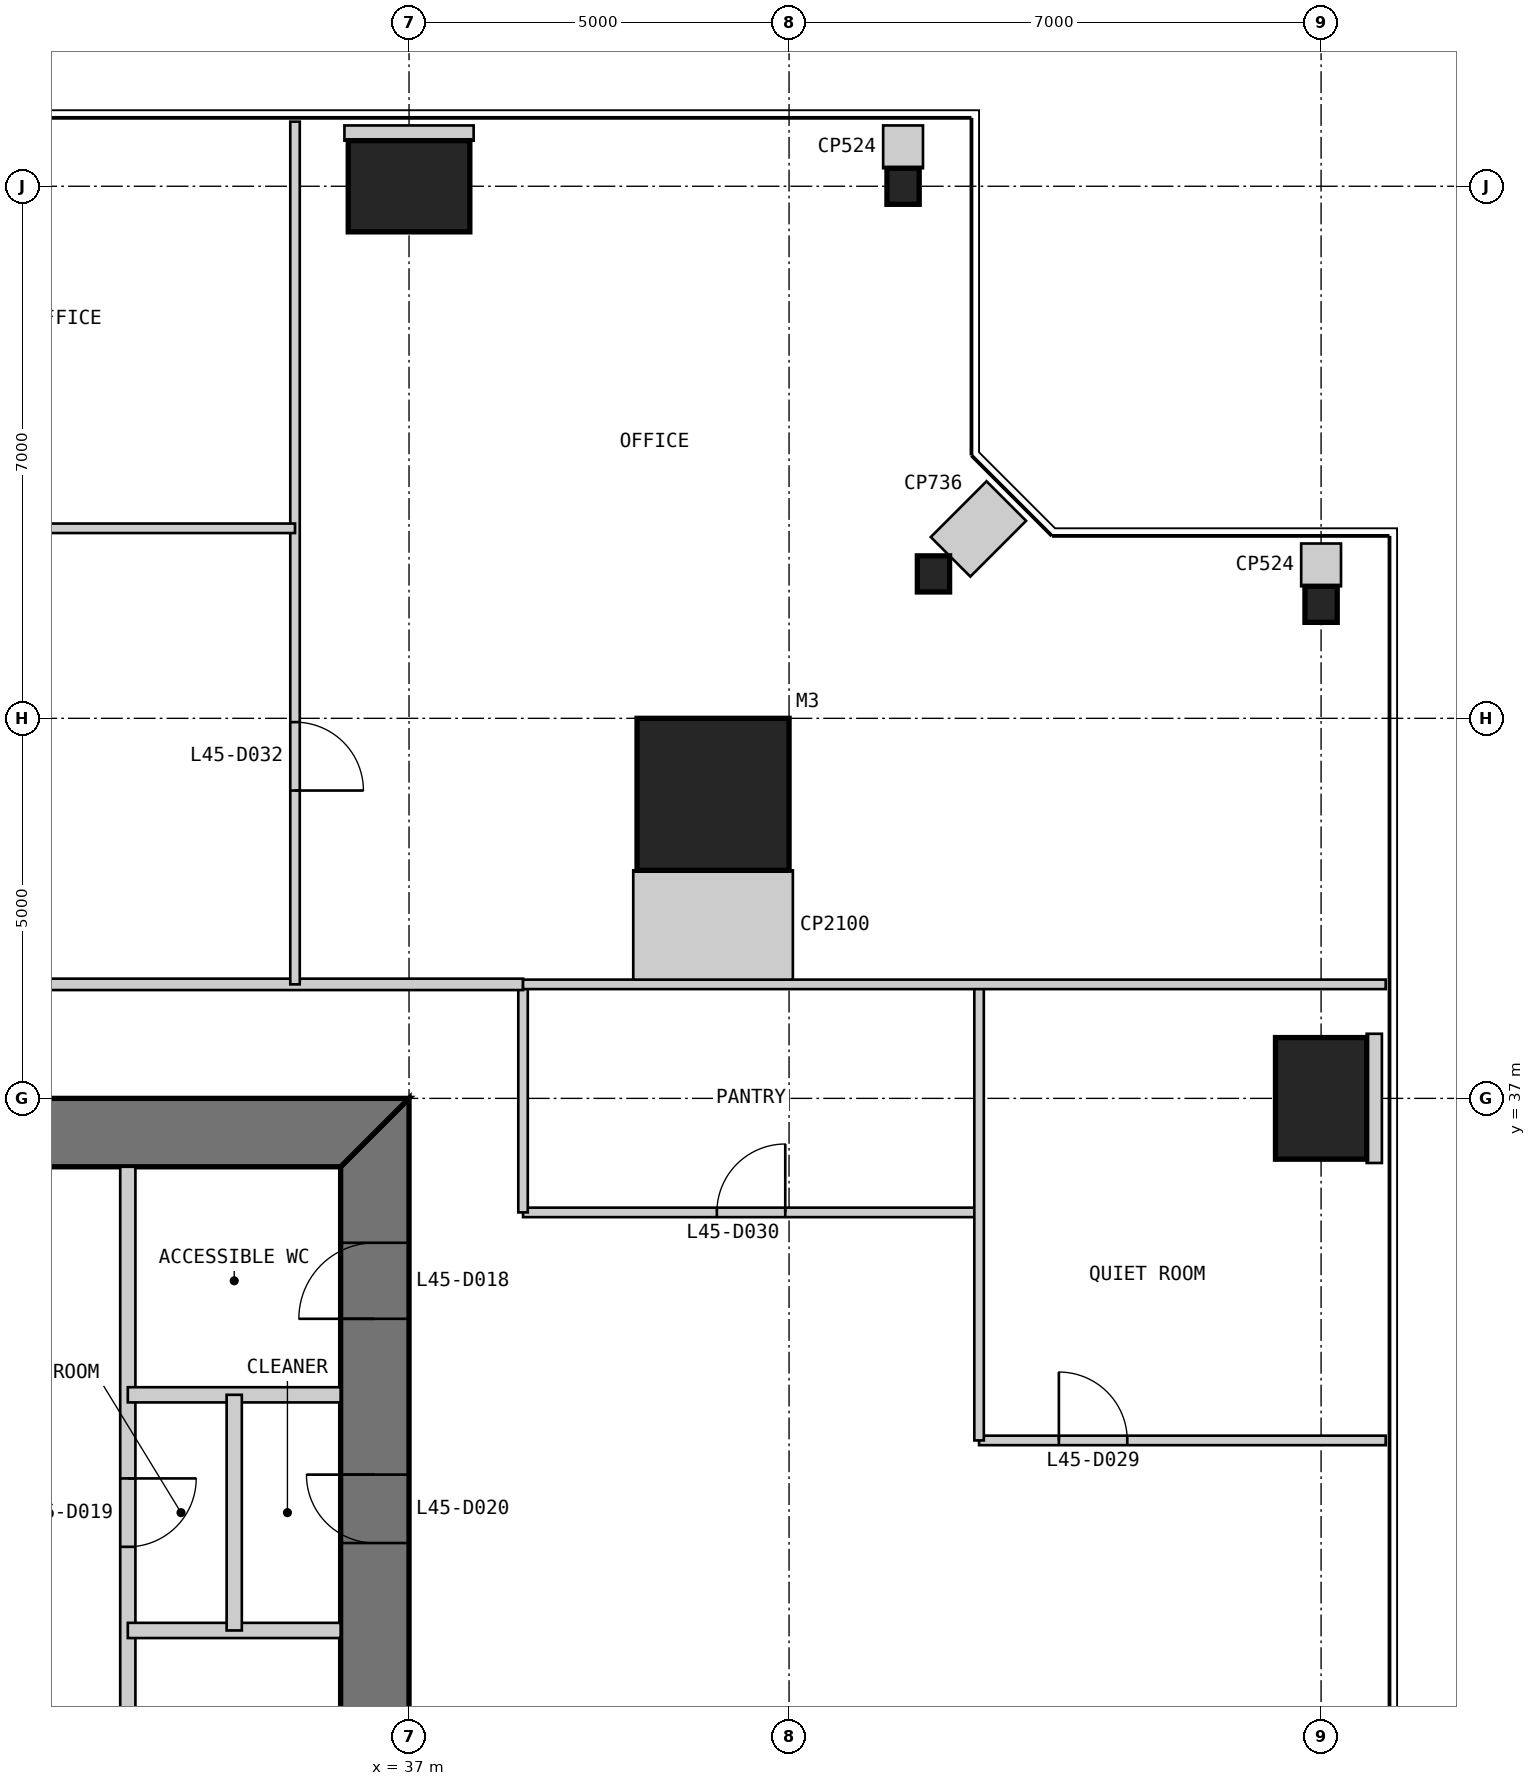
"""IFC4 building model, lengths in metres.
Left out: names, types, materials, properties, quantities, classifications, styles, units other than length and angle.
Written with IfcOpenShell. Run it as: python <this file> out.ifc"""

import sys

from ifc_helpers import new_model, si_unit, direction, frame, frame_2d, origin, origin_2d, place, context, subcontext, project, spatial, polyline, rectangle, i_section, outline, extrude, element, fill, save


model = new_model("IFC4")
c1 = context("Model", 3, precision=1e-05, world=origin(), true_north=direction((0.0, 1.0)))
c2 = subcontext(c1, "Body", "Model", "MODEL_VIEW")
j1 = project(units=[si_unit("LENGTHUNIT", "METRE"), si_unit("PLANEANGLEUNIT", "RADIAN")], contexts=[c1])
p1 = place(None, origin())
s1 = spatial("IfcSite", under=j1, at=p1, CompositionType="ELEMENT")
p2 = place(p1, origin())
s2 = spatial("IfcBuilding", under=s1, at=p2, CompositionType="ELEMENT")
p3 = place(p2, frame((0.0, 0.0, 193.8)))
s3 = spatial("IfcBuildingStorey", under=s2, at=p3, CompositionType="ELEMENT", Elevation=193.8)
p4 = place(p3, frame((41.0, 41.0, 0.0), z_axis=(0.0, 0.0, 1.0), x_axis=(1.0, 0.0, 0.0)))
e1 = element("IfcColumn", 1, at=p4, inside=s3, PredefinedType="COLUMN", context=c2, shape_type="SweptSolid", body=[
    extrude(rectangle(XDim=2.0, YDim=2.0, at=origin_2d()), origin(), (0.0, 0.0, 1.0), 4.0),
])
p5 = place(p3, frame((49.0, 37.0, 0.0), z_axis=(0.0, 0.0, 1.0), x_axis=(1.0, 0.0, 0.0)))
e2 = element("IfcColumn", 2, at=p5, inside=s3, PredefinedType="COLUMN", context=c2, shape_type="SweptSolid", body=[
    extrude(rectangle(XDim=1.2, YDim=1.6, at=origin_2d()), origin(), (0.0, 0.0, 1.0), 4.0),
])
for number, where, z_axis, x_axis in (
    (3, (49.0, 43.5, 0.0), (0.0, 0.0, 1.0), (1.0, 0.0, 0.0)),
    (4, (43.9, 43.9, 0.0), (0.0, 0.0, 1.0), (1.0, 0.0, 0.0)),
    (5, (43.5, 49.0, 0.0), (0.0, 0.0, 1.0), (1.0, 0.0, 0.0)),
):
    element("IfcColumn", number, at=place(p3, frame(where, z_axis=z_axis, x_axis=x_axis)), inside=s3, PredefinedType="COLUMN", context=c2, shape_type="SweptSolid", body=[
        extrude(i_section(OverallWidth=0.424, OverallDepth=0.475, WebThickness=0.048, FlangeThickness=0.077, at=origin_2d()), origin(), (0.0, 0.0, 1.0), 4.0),
    ])
p6 = place(p3, frame((37.0, 49.0, 0.0), z_axis=(0.0, 0.0, 1.0), x_axis=(1.0, 0.0, 0.0)))
e6 = element("IfcColumn", 6, at=p6, inside=s3, PredefinedType="COLUMN", context=c2, shape_type="SweptSolid", body=[
    extrude(rectangle(XDim=1.6, YDim=1.2, at=origin_2d()), origin(), (0.0, 0.0, 1.0), 4.0),
])
p7 = place(p3, frame((36.55, 13.9, 0.0), z_axis=(0.0, 0.0, 1.0), x_axis=(0.0, 1.0, 0.0)))
e7 = element("IfcWall", 7, at=p7, inside=s3, PredefinedType="SHEAR", context=c2, shape_type="SweptSolid", body=[
    extrude(outline(polyline([(-0.9, -0.45), (23.1, -0.45), (22.2, 0.45), (0.0, 0.45), (-0.9, -0.45)])), origin(), (0.0, 0.0, 1.0), 4.0),
])
p8 = place(p7, frame((20.2, 0.0, 0.0)))
e8 = element("IfcOpeningElement", 8, at=p8, cuts=e7, PredefinedType="OPENING", context=c2, shape_type="SweptSolid", body=[
    extrude(rectangle(XDim=1.0, YDim=2.2, at=frame_2d((0.5, 1.1))), frame((0.0, 0.46, 0.0), z_axis=(0.0, -1.0, 0.0), x_axis=(1.0, 0.0, 0.0)), (0.0, 0.0, 1.0), 0.92),
])
p9 = place(p7, frame((17.25, 0.0, 0.0)))
e9 = element("IfcOpeningElement", 9, at=p9, cuts=e7, PredefinedType="OPENING", context=c2, shape_type="SweptSolid", body=[
    extrude(rectangle(XDim=0.9, YDim=2.2, at=frame_2d((0.45, 1.1))), frame((0.0, 0.46, 0.0), z_axis=(0.0, -1.0, 0.0), x_axis=(1.0, 0.0, 0.0)), (0.0, 0.0, 1.0), 0.92),
])
p10 = place(p3, frame((37.0, 36.55, 0.0), z_axis=(0.0, 0.0, 1.0), x_axis=(-1.0, 0.0, 0.0)))
e10 = element("IfcWall", 10, at=p10, inside=s3, PredefinedType="SHEAR", context=c2, shape_type="SweptSolid", body=[
    extrude(outline(polyline([(0.0, -0.45), (24.0, -0.45), (23.1, 0.45), (0.9, 0.45), (0.0, -0.45)])), origin(), (0.0, 0.0, 1.0), 4.0),
])
p11 = place(p10, frame((4.9, 0.0, 0.0)))
e11 = element("IfcOpeningElement", 11, at=p11, cuts=e10, PredefinedType="OPENING", context=c2, shape_type="SweptSolid", body=[
    extrude(rectangle(XDim=1.0, YDim=2.2, at=frame_2d((0.5, 1.1))), frame((0.0, 0.46, 0.0), z_axis=(0.0, -1.0, 0.0), x_axis=(1.0, 0.0, 0.0)), (0.0, 0.0, 1.0), 0.92),
])
p12 = place(p10, frame((8.9, 0.0, 0.0)))
e12 = element("IfcOpeningElement", 12, at=p12, cuts=e10, PredefinedType="OPENING", context=c2, shape_type="SweptSolid", body=[
    extrude(rectangle(XDim=1.1, YDim=2.2, at=frame_2d((0.55, 1.1))), frame((0.0, 0.46, 0.0), z_axis=(0.0, -1.0, 0.0), x_axis=(1.0, 0.0, 0.0)), (0.0, 0.0, 1.0), 0.92),
])
p13 = place(p10, frame((15.05, 0.0, 0.0)))
e13 = element("IfcOpeningElement", 13, at=p13, cuts=e10, PredefinedType="OPENING", context=c2, shape_type="SweptSolid", body=[
    extrude(rectangle(XDim=0.9, YDim=2.2, at=frame_2d((0.45, 1.1))), frame((0.0, 0.46, 0.0), z_axis=(0.0, -1.0, 0.0), x_axis=(1.0, 0.0, 0.0)), (0.0, 0.0, 1.0), 0.92),
])
p14 = place(p10, frame((17.9, 0.0, 0.0)))
e14 = element("IfcOpeningElement", 14, at=p14, cuts=e10, PredefinedType="OPENING", context=c2, shape_type="SweptSolid", body=[
    extrude(rectangle(XDim=1.0, YDim=2.2, at=frame_2d((0.5, 1.1))), frame((0.0, 0.46, 0.0), z_axis=(0.0, -1.0, 0.0), x_axis=(1.0, 0.0, 0.0)), (0.0, 0.0, 1.0), 0.92),
])
p15 = place(p10, frame((21.4, 0.0, 0.0)))
e15 = element("IfcOpeningElement", 15, at=p15, cuts=e10, PredefinedType="OPENING", context=c2, shape_type="SweptSolid", body=[
    extrude(rectangle(XDim=1.0, YDim=2.2, at=frame_2d((0.5, 1.1))), frame((0.0, 0.46, 0.0), z_axis=(0.0, -1.0, 0.0), x_axis=(1.0, 0.0, 0.0)), (0.0, 0.0, 1.0), 0.92),
])
p16 = place(p3, frame((33.3, 36.1, 0.0), z_axis=(0.0, 0.0, 1.0), x_axis=(0.0, -1.0, 0.0)))
e16 = element("IfcWall", 16, at=p16, inside=s3, PredefinedType="PARTITIONING", context=c2, shape_type="SweptSolid", body=[
    extrude(rectangle(XDim=16.1, YDim=0.2, at=frame_2d((8.05, 0.0))), origin(), (0.0, 0.0, 1.0), 3.8),
])
p17 = place(p16, frame((4.1, 0.0, 0.0)))
e17 = element("IfcOpeningElement", 17, at=p17, cuts=e16, PredefinedType="OPENING", context=c2, shape_type="SweptSolid", body=[
    extrude(rectangle(XDim=0.9, YDim=2.2, at=frame_2d((0.45, 1.1))), frame((0.0, 0.11, 0.0), z_axis=(0.0, -1.0, 0.0), x_axis=(1.0, 0.0, 0.0)), (0.0, 0.0, 1.0), 0.22),
])
for number, where, z_axis, x_axis in (
    (18, (36.1, 30.0, 0.0), (0.0, 0.0, 1.0), (-1.0, 0.0, 0.0)),
    (19, (36.1, 33.1, 0.0), (0.0, 0.0, 1.0), (-1.0, 0.0, 0.0)),
):
    element("IfcWall", number, at=place(p3, frame(where, z_axis=z_axis, x_axis=x_axis)), inside=s3, PredefinedType="PARTITIONING", context=c2, shape_type="SweptSolid", body=[
        extrude(rectangle(XDim=2.8, YDim=0.2, at=frame_2d((1.4, 0.0))), origin(), (0.0, 0.0, 1.0), 3.8),
    ])
p18 = place(p3, frame((34.7, 33.1, 0.0), z_axis=(0.0, 0.0, 1.0), x_axis=(0.0, -1.0, 0.0)))
e20 = element("IfcWall", 20, at=p18, inside=s3, PredefinedType="PARTITIONING", context=c2, shape_type="SweptSolid", body=[
    extrude(rectangle(XDim=3.1, YDim=0.2, at=frame_2d((1.55, 0.0))), origin(), (0.0, 0.0, 1.0), 3.8),
])
p19 = place(p3, frame((49.85, 32.5, 0.0), z_axis=(0.0, 0.0, 1.0), x_axis=(-1.0, 0.0, 0.0)))
e21 = element("IfcWall", 21, at=p19, inside=s3, PredefinedType="PARTITIONING", context=c2, shape_type="SweptSolid", body=[
    extrude(rectangle(XDim=5.35, YDim=0.125, at=frame_2d((2.675, 0.0))), origin(), (0.0, 0.0, 1.0), 3.85),
])
p20 = place(p19, frame((3.4, 0.0, 0.0)))
e22 = element("IfcOpeningElement", 22, at=p20, cuts=e21, PredefinedType="OPENING", context=c2, shape_type="SweptSolid", body=[
    extrude(rectangle(XDim=0.9, YDim=2.2, at=frame_2d((0.45, 1.1))), frame((0.0, 0.073, 0.0), z_axis=(0.0, -1.0, 0.0), x_axis=(1.0, 0.0, 0.0)), (0.0, 0.0, 1.0), 0.145),
])
p21 = place(p3, frame((44.5, 35.5, 0.0), z_axis=(0.0, 0.0, 1.0), x_axis=(-1.0, 0.0, 0.0)))
e23 = element("IfcWall", 23, at=p21, inside=s3, PredefinedType="PARTITIONING", context=c2, shape_type="SweptSolid", body=[
    extrude(rectangle(XDim=6.0, YDim=0.125, at=frame_2d((3.0, 0.0))), origin(), (0.0, 0.0, 1.0), 3.85),
])
p22 = place(p21, frame((2.55, 0.0, 0.0)))
e24 = element("IfcOpeningElement", 24, at=p22, cuts=e23, PredefinedType="OPENING", context=c2, shape_type="SweptSolid", body=[
    extrude(rectangle(XDim=0.9, YDim=2.2, at=frame_2d((0.45, 1.1))), frame((0.0, 0.073, 0.0), z_axis=(0.0, -1.0, 0.0), x_axis=(1.0, 0.0, 0.0)), (0.0, 0.0, 1.0), 0.145),
])
p23 = place(p3, frame((44.5, 32.5, 0.0), z_axis=(0.0, 0.0, 1.0), x_axis=(0.0, 1.0, 0.0)))
e25 = element("IfcWall", 25, at=p23, inside=s3, PredefinedType="PARTITIONING", context=c2, shape_type="SweptSolid", body=[
    extrude(rectangle(XDim=6.0, YDim=0.125, at=frame_2d((3.0, 0.0))), origin(), (0.0, 0.0, 1.0), 3.85),
])
p24 = place(p3, frame((38.5, 35.5, 0.0), z_axis=(0.0, 0.0, 1.0), x_axis=(0.0, 1.0, 0.0)))
e26 = element("IfcWall", 26, at=p24, inside=s3, PredefinedType="PARTITIONING", context=c2, shape_type="SweptSolid", body=[
    extrude(rectangle(XDim=3.0, YDim=0.125, at=frame_2d((1.5, 0.0))), origin(), (0.0, 0.0, 1.0), 3.85),
])
p25 = place(p3, frame((38.5, 38.5, 0.0), z_axis=(0.0, 0.0, 1.0), x_axis=(-1.0, 0.0, 0.0)))
e27 = element("IfcWall", 27, at=p25, inside=s3, PredefinedType="PARTITIONING", context=c2, shape_type="SweptSolid", body=[
    extrude(rectangle(XDim=27.0, YDim=0.15, at=frame_2d((13.5, 0.0))), origin(), (0.0, 0.0, 1.0), 3.85),
])
p26 = place(p25, frame((13.0, 0.0, 0.0)))
e28 = element("IfcOpeningElement", 28, at=p26, cuts=e27, PredefinedType="OPENING", context=c2, shape_type="SweptSolid", body=[
    extrude(rectangle(XDim=1.0, YDim=2.2, at=frame_2d((0.5, 1.1))), frame((0.0, 0.085, 0.0), z_axis=(0.0, -1.0, 0.0), x_axis=(1.0, 0.0, 0.0)), (0.0, 0.0, 1.0), 0.17),
])
p27 = place(p3, frame((49.85, 38.5, 0.0), z_axis=(0.0, 0.0, 1.0), x_axis=(-1.0, 0.0, 0.0)))
e29 = element("IfcWall", 29, at=p27, inside=s3, PredefinedType="PARTITIONING", context=c2, shape_type="SweptSolid", body=[
    extrude(rectangle(XDim=11.35, YDim=0.125, at=frame_2d((5.675, 0.0))), origin(), (0.0, 0.0, 1.0), 3.85),
])
p28 = place(p3, frame((35.5, 49.85, 0.0), z_axis=(0.0, 0.0, 1.0), x_axis=(0.0, -1.0, 0.0)))
e30 = element("IfcWall", 30, at=p28, inside=s3, PredefinedType="PARTITIONING", context=c2, shape_type="SweptSolid", body=[
    extrude(rectangle(XDim=11.35, YDim=0.125, at=frame_2d((5.675, 0.0))), origin(), (0.0, 0.0, 1.0), 3.85),
])
p29 = place(p28, frame((7.9, 0.0, 0.0)))
e31 = element("IfcOpeningElement", 31, at=p29, cuts=e30, PredefinedType="OPENING", context=c2, shape_type="SweptSolid", body=[
    extrude(rectangle(XDim=0.9, YDim=2.2, at=frame_2d((0.45, 1.1))), frame((0.0, 0.073, 0.0), z_axis=(0.0, -1.0, 0.0), x_axis=(1.0, 0.0, 0.0)), (0.0, 0.0, 1.0), 0.145),
])
p30 = place(p3, frame((35.5, 44.5, 0.0), z_axis=(0.0, 0.0, 1.0), x_axis=(-1.0, 0.0, 0.0)))
e32 = element("IfcWall", 32, at=p30, inside=s3, PredefinedType="PARTITIONING", context=c2, shape_type="SweptSolid", body=[
    extrude(rectangle(XDim=24.0, YDim=0.125, at=frame_2d((12.0, 0.0))), origin(), (0.0, 0.0, 1.0), 3.85),
])
p31 = place(p30, frame((4.05, 0.0, 0.0)))
e33 = element("IfcOpeningElement", 33, at=p31, cuts=e32, PredefinedType="OPENING", context=c2, shape_type="SweptSolid", body=[
    extrude(rectangle(XDim=0.9, YDim=2.2, at=frame_2d((0.45, 1.1))), frame((0.0, 0.073, 0.0), z_axis=(0.0, -1.0, 0.0), x_axis=(1.0, 0.0, 0.0)), (0.0, 0.0, 1.0), 0.145),
])
p32 = place(p30, frame((10.05, 0.0, 0.0)))
e34 = element("IfcOpeningElement", 34, at=p32, cuts=e32, PredefinedType="OPENING", context=c2, shape_type="SweptSolid", body=[
    extrude(rectangle(XDim=0.9, YDim=2.2, at=frame_2d((0.45, 1.1))), frame((0.0, 0.073, 0.0), z_axis=(0.0, -1.0, 0.0), x_axis=(1.0, 0.0, 0.0)), (0.0, 0.0, 1.0), 0.145),
])
p33 = place(p30, frame((16.05, 0.0, 0.0)))
e35 = element("IfcOpeningElement", 35, at=p33, cuts=e32, PredefinedType="OPENING", context=c2, shape_type="SweptSolid", body=[
    extrude(rectangle(XDim=0.9, YDim=2.2, at=frame_2d((0.45, 1.1))), frame((0.0, 0.073, 0.0), z_axis=(0.0, -1.0, 0.0), x_axis=(1.0, 0.0, 0.0)), (0.0, 0.0, 1.0), 0.145),
])
p34 = place(p30, frame((19.05, 0.0, 0.0)))
e36 = element("IfcOpeningElement", 36, at=p34, cuts=e32, PredefinedType="OPENING", context=c2, shape_type="SweptSolid", body=[
    extrude(rectangle(XDim=0.9, YDim=2.2, at=frame_2d((0.45, 1.1))), frame((0.0, 0.073, 0.0), z_axis=(0.0, -1.0, 0.0), x_axis=(1.0, 0.0, 0.0)), (0.0, 0.0, 1.0), 0.145),
])
p35 = place(p3, frame((49.8, 37.0, 0.0), z_axis=(0.0, 0.0, 1.0), x_axis=(-1.0, 0.0, 0.0)))
e37 = element("IfcWall", 37, at=p35, inside=s3, PredefinedType="PARTITIONING", context=c2, shape_type="SweptSolid", body=[
    extrude(rectangle(XDim=0.2, YDim=1.7, at=frame_2d((0.1, 0.0))), origin(), (0.0, 0.0, 1.0), 3.85),
])
p36 = place(p3, frame((41.0, 38.562, 0.0), z_axis=(0.0, 0.0, 1.0), x_axis=(0.0, 1.0, 0.0)))
e38 = element("IfcWall", 38, at=p36, inside=s3, PredefinedType="PARTITIONING", context=c2, shape_type="SweptSolid", body=[
    extrude(rectangle(XDim=1.438, YDim=2.1, at=frame_2d((0.719, 0.0))), origin(), (0.0, 0.0, 1.0), 3.85),
])
p37 = place(p3, frame((49.0, 44.3, 0.0), z_axis=(0.0, 0.0, 1.0), x_axis=(0.0, -1.0, 0.0)))
e39 = element("IfcWall", 39, at=p37, inside=s3, PredefinedType="PARTITIONING", context=c2, shape_type="SweptSolid", body=[
    extrude(rectangle(XDim=0.562, YDim=0.524, at=frame_2d((0.281, 0.0))), origin(), (0.0, 0.0, 1.0), 3.85),
])
p38 = place(p3, frame((44.859, 44.859, 0.0), z_axis=(0.0, 0.0, 1.0), x_axis=(-0.707106781187, -0.707106781187, 0.0)))
e40 = element("IfcWall", 40, at=p38, inside=s3, PredefinedType="PARTITIONING", context=c2, shape_type="SweptSolid", body=[
    extrude(rectangle(XDim=1.038, YDim=0.736, at=frame_2d((0.519, 0.0))), origin(), (0.0, 0.0, 1.0), 3.85),
])
p39 = place(p3, frame((43.5, 49.8, 0.0), z_axis=(0.0, 0.0, 1.0), x_axis=(0.0, -1.0, 0.0)))
e41 = element("IfcWall", 41, at=p39, inside=s3, PredefinedType="PARTITIONING", context=c2, shape_type="SweptSolid", body=[
    extrude(rectangle(XDim=0.562, YDim=0.524, at=frame_2d((0.281, 0.0))), origin(), (0.0, 0.0, 1.0), 3.85),
])
p40 = place(p3, frame((37.0, 49.8, 0.0), z_axis=(0.0, 0.0, 1.0), x_axis=(0.0, -1.0, 0.0)))
e42 = element("IfcWall", 42, at=p40, inside=s3, PredefinedType="PARTITIONING", context=c2, shape_type="SweptSolid", body=[
    extrude(rectangle(XDim=0.2, YDim=1.7, at=frame_2d((0.1, 0.0))), origin(), (0.0, 0.0, 1.0), 3.85),
])
p41 = place(p8, origin())
e43 = element("IfcDoor", 43, at=p41, inside=s3, OperationType="SINGLE_SWING_LEFT", PredefinedType="DOOR", context=c2, shape_type="SweptSolid", body=[
    extrude(rectangle(XDim=1.0, YDim=2.2, at=frame_2d((0.5, 1.1))), frame((0.0, 0.025, 0.0), z_axis=(0.0, -1.0, 0.0), x_axis=(1.0, 0.0, 0.0)), (0.0, 0.0, 1.0), 0.05),
    extrude(outline(polyline([(0.0, 0.0), (0.04, 0.0), (0.04, 2.16), (0.96, 2.16), (0.96, 0.0), (1.0, 0.0), (1.0, 2.2), (0.0, 2.2), (0.0, 0.0)])), frame((0.0, 0.3, 0.0), z_axis=(0.0, -1.0, 0.0), x_axis=(1.0, 0.0, 0.0)), (0.0, 0.0, 1.0), 0.6),
])
fill(e8, e43)
p42 = place(p17, origin())
e44 = element("IfcDoor", 44, at=p42, inside=s3, OperationType="SINGLE_SWING_LEFT", PredefinedType="DOOR", context=c2, shape_type="SweptSolid", body=[
    extrude(rectangle(XDim=0.9, YDim=2.2, at=frame_2d((0.45, 1.1))), frame((0.0, 0.025, 0.0), z_axis=(0.0, -1.0, 0.0), x_axis=(1.0, 0.0, 0.0)), (0.0, 0.0, 1.0), 0.05),
])
fill(e17, e44)
p43 = place(p9, origin())
e45 = element("IfcDoor", 45, at=p43, inside=s3, OperationType="SINGLE_SWING_RIGHT", PredefinedType="DOOR", context=c2, shape_type="SweptSolid", body=[
    extrude(rectangle(XDim=0.9, YDim=2.2, at=frame_2d((0.45, 1.1))), frame((0.0, 0.025, 0.0), z_axis=(0.0, -1.0, 0.0), x_axis=(1.0, 0.0, 0.0)), (0.0, 0.0, 1.0), 0.05),
    extrude(outline(polyline([(0.0, 0.0), (0.04, 0.0), (0.04, 2.16), (0.86, 2.16), (0.86, 0.0), (0.9, 0.0), (0.9, 2.2), (0.0, 2.2), (0.0, 0.0)])), frame((0.0, 0.3, 0.0), z_axis=(0.0, -1.0, 0.0), x_axis=(1.0, 0.0, 0.0)), (0.0, 0.0, 1.0), 0.6),
])
fill(e9, e45)
p44 = place(p20, frame((0.9, 0.0, 0.0), z_axis=(0.0, 0.0, 1.0), x_axis=(-1.0, 0.0, 0.0)))
e46 = element("IfcDoor", 46, at=p44, inside=s3, OperationType="SINGLE_SWING_LEFT", PredefinedType="DOOR", context=c2, shape_type="SweptSolid", body=[
    extrude(rectangle(XDim=0.9, YDim=2.2, at=frame_2d((0.45, 1.1))), frame((0.0, 0.025, 0.0), z_axis=(0.0, -1.0, 0.0), x_axis=(1.0, 0.0, 0.0)), (0.0, 0.0, 1.0), 0.05),
])
fill(e22, e46)
p45 = place(p22, frame((0.9, 0.0, 0.0), z_axis=(0.0, 0.0, 1.0), x_axis=(-1.0, 0.0, 0.0)))
e47 = element("IfcDoor", 47, at=p45, inside=s3, OperationType="SINGLE_SWING_RIGHT", PredefinedType="DOOR", context=c2, shape_type="SweptSolid", body=[
    extrude(rectangle(XDim=0.9, YDim=2.2, at=frame_2d((0.45, 1.1))), frame((0.0, 0.025, 0.0), z_axis=(0.0, -1.0, 0.0), x_axis=(1.0, 0.0, 0.0)), (0.0, 0.0, 1.0), 0.05),
])
fill(e24, e47)
p46 = place(p29, origin())
e48 = element("IfcDoor", 48, at=p46, inside=s3, OperationType="SINGLE_SWING_RIGHT", PredefinedType="DOOR", context=c2, shape_type="SweptSolid", body=[
    extrude(rectangle(XDim=0.9, YDim=2.2, at=frame_2d((0.45, 1.1))), frame((0.0, 0.025, 0.0), z_axis=(0.0, -1.0, 0.0), x_axis=(1.0, 0.0, 0.0)), (0.0, 0.0, 1.0), 0.05),
])
fill(e31, e48)
save(model, sys.argv[1])
